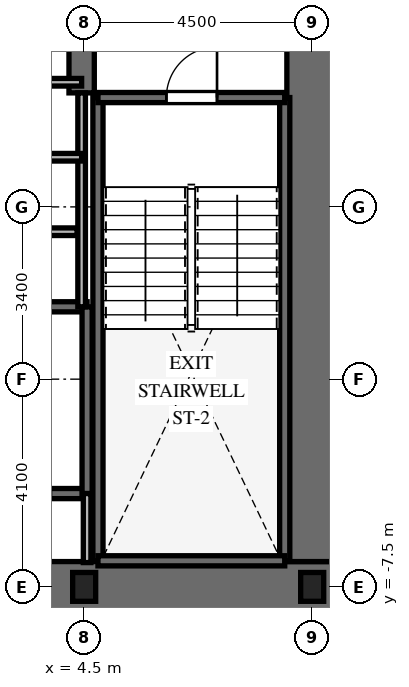
"""IFC4 building model, lengths in metres.
Left out: names, types, materials, properties, quantities, classifications, styles, units other than length and angle.
Written with IfcOpenShell. Run it as: python <this file> out.ifc"""

import sys

from ifc_helpers import new_model, si_unit, direction, frame, frame_2d, origin, origin_2d, place, context, subcontext, project, spatial, rectangle, i_section, extrude, element, fill, save


model = new_model("IFC4")
c1 = context("Model", 3, precision=1e-05, world=origin(), true_north=direction((0.0, 1.0)))
c2 = subcontext(c1, "Body", "Model", "MODEL_VIEW")
j1 = project(units=[si_unit("LENGTHUNIT", "METRE"), si_unit("PLANEANGLEUNIT", "RADIAN")], contexts=[c1])
p1 = place(None, origin())
s1 = spatial("IfcSite", under=j1, at=p1, CompositionType="ELEMENT")
p2 = place(p1, origin())
s2 = spatial("IfcBuilding", under=s1, at=p2, CompositionType="ELEMENT")
p3 = place(p2, frame((0.0, 0.0, 45.3)))
s3 = spatial("IfcBuildingStorey", under=s2, at=p3, CompositionType="ELEMENT", Elevation=45.3)
p4 = place(p3, frame((-9.5, -7.5, 0.0), z_axis=(0.0, 0.0, 1.0), x_axis=(1.0, 0.0, 0.0)))
e1 = element("IfcWall", 1, at=p4, inside=s3, PredefinedType="SHEAR", context=c2, shape_type="SweptSolid", body=[
    extrude(rectangle(XDim=19.0, YDim=1.0, at=frame_2d((9.5, 0.0))), origin(), (0.0, 0.0, 1.0), 3.7),
])
p5 = place(p4, frame((9.55, 0.0, 0.0)))
e2 = element("IfcOpeningElement", 2, at=p5, cuts=e1, PredefinedType="OPENING", context=c2, shape_type="SweptSolid", body=[
    extrude(rectangle(XDim=1.0, YDim=2.15, at=frame_2d((0.5, 1.075))), frame((0.0, 0.51, 0.0), z_axis=(0.0, -1.0, 0.0), x_axis=(1.0, 0.0, 0.0)), (0.0, 0.0, 1.0), 1.02),
])
p6 = place(p3, frame((9.0, -7.0, 0.0), z_axis=(0.0, 0.0, 1.0), x_axis=(0.0, 1.0, 0.0)))
e3 = element("IfcWall", 3, at=p6, inside=s3, PredefinedType="SHEAR", context=c2, shape_type="SweptSolid", body=[
    extrude(rectangle(XDim=14.0, YDim=1.0, at=frame_2d((7.0, 0.0))), origin(), (0.0, 0.0, 1.0), 3.7),
])
p7 = place(p6, frame((10.125, 0.0, 0.0)))
e4 = element("IfcOpeningElement", 4, at=p7, cuts=e3, PredefinedType="OPENING", context=c2, shape_type="SweptSolid", body=[
    extrude(rectangle(XDim=1.05, YDim=2.15, at=frame_2d((0.525, 1.075))), frame((0.0, 0.51, 0.0), z_axis=(0.0, -1.0, 0.0), x_axis=(1.0, 0.0, 0.0)), (0.0, 0.0, 1.0), 1.02),
])
p8 = place(p3, frame((4.45, 2.25, 0.0), z_axis=(0.0, 0.0, 1.0), x_axis=(0.0, 1.0, 0.0)))
e5 = element("IfcWall", 5, at=p8, inside=s3, PredefinedType="SHEAR", context=c2, shape_type="SweptSolid", body=[
    extrude(rectangle(XDim=4.75, YDim=0.5, at=frame_2d((2.375, 0.0))), origin(), (0.0, 0.0, 1.0), 3.7),
])
for number, where, z_axis, x_axis in (
    (6, (4.772, -6.985, 0.0), (0.0, 0.0, 1.0), (0.0, 1.0, 0.0)),
    (7, (8.458, -6.985, 0.0), (0.0, 0.0, 1.0), (0.0, 1.0, 0.0)),
):
    element("IfcWall", number, at=place(p3, frame(where, z_axis=z_axis, x_axis=x_axis)), inside=s3, PredefinedType="SHEAR", context=c2, shape_type="SweptSolid", body=[
        extrude(rectangle(XDim=9.143, YDim=0.2, at=frame_2d((4.572, 0.0))), origin(), (0.0, 0.0, 1.0), 3.7),
    ])
p9 = place(p3, frame((4.772, -6.985, 0.0), z_axis=(0.0, 0.0, 1.0), x_axis=(1.0, 0.0, 0.0)))
e8 = element("IfcWall", 8, at=p9, inside=s3, PredefinedType="SHEAR", context=c2, shape_type="SweptSolid", body=[
    extrude(rectangle(XDim=3.686, YDim=0.2, at=frame_2d((1.843, 0.0))), origin(), (0.0, 0.0, 1.0), 3.7),
])
p10 = place(p3, frame((4.772, 2.158, 0.0), z_axis=(0.0, 0.0, 1.0), x_axis=(1.0, 0.0, 0.0)))
e9 = element("IfcWall", 9, at=p10, inside=s3, PredefinedType="SHEAR", context=c2, shape_type="SweptSolid", body=[
    extrude(rectangle(XDim=3.686, YDim=0.2, at=frame_2d((1.843, 0.0))), origin(), (0.0, 0.0, 1.0), 3.7),
])
p11 = place(p10, frame((1.35, 0.0, 0.0)))
e10 = element("IfcOpeningElement", 10, at=p11, cuts=e9, PredefinedType="OPENING", context=c2, shape_type="SweptSolid", body=[
    extrude(rectangle(XDim=1.0, YDim=2.15, at=frame_2d((0.5, 1.075))), frame((0.0, 0.11, 0.0), z_axis=(0.0, -1.0, 0.0), x_axis=(1.0, 0.0, 0.0)), (0.0, 0.0, 1.0), 0.22),
])
p12 = place(p3, frame((-4.608, -5.658, 0.0), z_axis=(0.0, 0.0, 1.0), x_axis=(1.0, 0.0, 0.0)))
e11 = element("IfcWall", 11, at=p12, inside=s3, PredefinedType="SHEAR", context=c2, shape_type="SweptSolid", body=[
    extrude(rectangle(XDim=9.166, YDim=0.2, at=frame_2d((4.583, 0.0))), origin(), (0.0, 0.0, 1.0), 3.7),
])
p13 = place(p12, frame((7.45, 0.0, 0.0)))
e12 = element("IfcOpeningElement", 12, at=p13, cuts=e11, PredefinedType="OPENING", context=c2, shape_type="SweptSolid", body=[
    extrude(rectangle(XDim=1.0, YDim=2.15, at=frame_2d((0.5, 1.075))), frame((0.0, 0.11, 0.0), z_axis=(0.0, -1.0, 0.0), x_axis=(1.0, 0.0, 0.0)), (0.0, 0.0, 1.0), 0.22),
])
p14 = place(p3, frame((-4.608, -1.972, 0.0), z_axis=(0.0, 0.0, 1.0), x_axis=(1.0, 0.0, 0.0)))
e13 = element("IfcWall", 13, at=p14, inside=s3, PredefinedType="SHEAR", context=c2, shape_type="SweptSolid", body=[
    extrude(rectangle(XDim=9.166, YDim=0.2, at=frame_2d((4.583, 0.0))), origin(), (0.0, 0.0, 1.0), 3.7),
])
p15 = place(p3, frame((4.558, -5.658, 0.0), z_axis=(0.0, 0.0, 1.0), x_axis=(0.0, 1.0, 0.0)))
e14 = element("IfcWall", 14, at=p15, inside=s3, PredefinedType="SHEAR", context=c2, shape_type="SweptSolid", body=[
    extrude(rectangle(XDim=3.686, YDim=0.2, at=frame_2d((1.843, 0.0))), origin(), (0.0, 0.0, 1.0), 3.7),
])
for number, where, z_axis, x_axis in (
    (15, (4.5, -7.5, 0.0), (0.0, 0.0, 1.0), (1.0, 0.0, 0.0)),
    (16, (9.0, -7.5, 0.0), (0.0, 0.0, 1.0), (1.0, 0.0, 0.0)),
):
    element("IfcColumn", number, at=place(p3, frame(where, z_axis=z_axis, x_axis=x_axis)), inside=s3, PredefinedType="COLUMN", context=c2, shape_type="SweptSolid", body=[
        extrude(i_section(OverallWidth=0.454, OverallDepth=0.569, WebThickness=0.078, FlangeThickness=0.125, at=origin_2d()), origin(), (0.0, 0.0, 1.0), 3.7),
    ])
p16 = place(p3, frame((4.558, -7.02, 0.0), z_axis=(0.0, 0.0, 1.0), x_axis=(0.0, 1.0, 0.0)))
e17 = element("IfcWall", 17, at=p16, inside=s3, PredefinedType="PARTITIONING", context=c2, shape_type="SweptSolid", body=[
    extrude(rectangle(XDim=1.362, YDim=0.15, at=frame_2d((0.681, 0.0))), origin(), (0.0, 0.0, 1.0), 3.4),
])
p17 = place(p3, frame((4.45, -1.972, 0.0), z_axis=(0.0, 0.0, 1.0), x_axis=(0.0, 1.0, 0.0)))
e18 = element("IfcWall", 18, at=p17, inside=s3, PredefinedType="PARTITIONING", context=c2, shape_type="SweptSolid", body=[
    extrude(rectangle(XDim=4.222, YDim=0.15, at=frame_2d((2.111, 0.0))), origin(), (0.0, 0.0, 1.0), 3.4),
])
for number, where, z_axis, x_axis in (
    (19, (1.9, 0.98, 0.0), (0.0, 0.0, 1.0), (1.0, 0.0, 0.0)),
    (20, (1.9, 2.46, 0.0), (0.0, 0.0, 1.0), (1.0, 0.0, 0.0)),
):
    element("IfcWall", number, at=place(p3, frame(where, z_axis=z_axis, x_axis=x_axis)), inside=s3, PredefinedType="PARTITIONING", context=c2, shape_type="SweptSolid", body=[
        extrude(rectangle(XDim=2.55, YDim=0.15, at=frame_2d((1.275, 0.0))), origin(), (0.0, 0.0, 1.0), 3.4),
    ])
p18 = place(p3, frame((-4.36, -0.49, 0.0), z_axis=(0.0, 0.0, 1.0), x_axis=(1.0, 0.0, 0.0)))
e21 = element("IfcWall", 21, at=p18, inside=s3, PredefinedType="PARTITIONING", context=c2, shape_type="SweptSolid", body=[
    extrude(rectangle(XDim=8.72, YDim=0.15, at=frame_2d((4.36, 0.0))), origin(), (0.0, 0.0, 1.0), 3.4),
])
p19 = place(p18, frame((3.16, 0.0, 0.0)))
e22 = element("IfcOpeningElement", 22, at=p19, cuts=e21, PredefinedType="OPENING", context=c2, shape_type="SweptSolid", body=[
    extrude(rectangle(XDim=0.85, YDim=2.03, at=frame_2d((0.425, 1.015))), frame((0.0, 0.085, 0.0), z_axis=(0.0, -1.0, 0.0), x_axis=(1.0, 0.0, 0.0)), (0.0, 0.0, 1.0), 0.17),
])
p20 = place(p18, frame((5.21, 0.0, 0.0)))
e23 = element("IfcOpeningElement", 23, at=p20, cuts=e21, PredefinedType="OPENING", context=c2, shape_type="SweptSolid", body=[
    extrude(rectangle(XDim=0.85, YDim=2.03, at=frame_2d((0.425, 1.015))), frame((0.0, 0.085, 0.0), z_axis=(0.0, -1.0, 0.0), x_axis=(1.0, 0.0, 0.0)), (0.0, 0.0, 1.0), 0.17),
])
p21 = place(p11, origin())
e24 = element("IfcDoor", 24, at=p21, inside=s3, OperationType="SINGLE_SWING_RIGHT", PredefinedType="DOOR", context=c2, shape_type="SweptSolid", body=[
    extrude(rectangle(XDim=1.0, YDim=2.15, at=frame_2d((0.5, 1.075))), frame((0.0, 0.025, 0.0), z_axis=(0.0, -1.0, 0.0), x_axis=(1.0, 0.0, 0.0)), (0.0, 0.0, 1.0), 0.05),
])
fill(e10, e24)
save(model, sys.argv[1])
